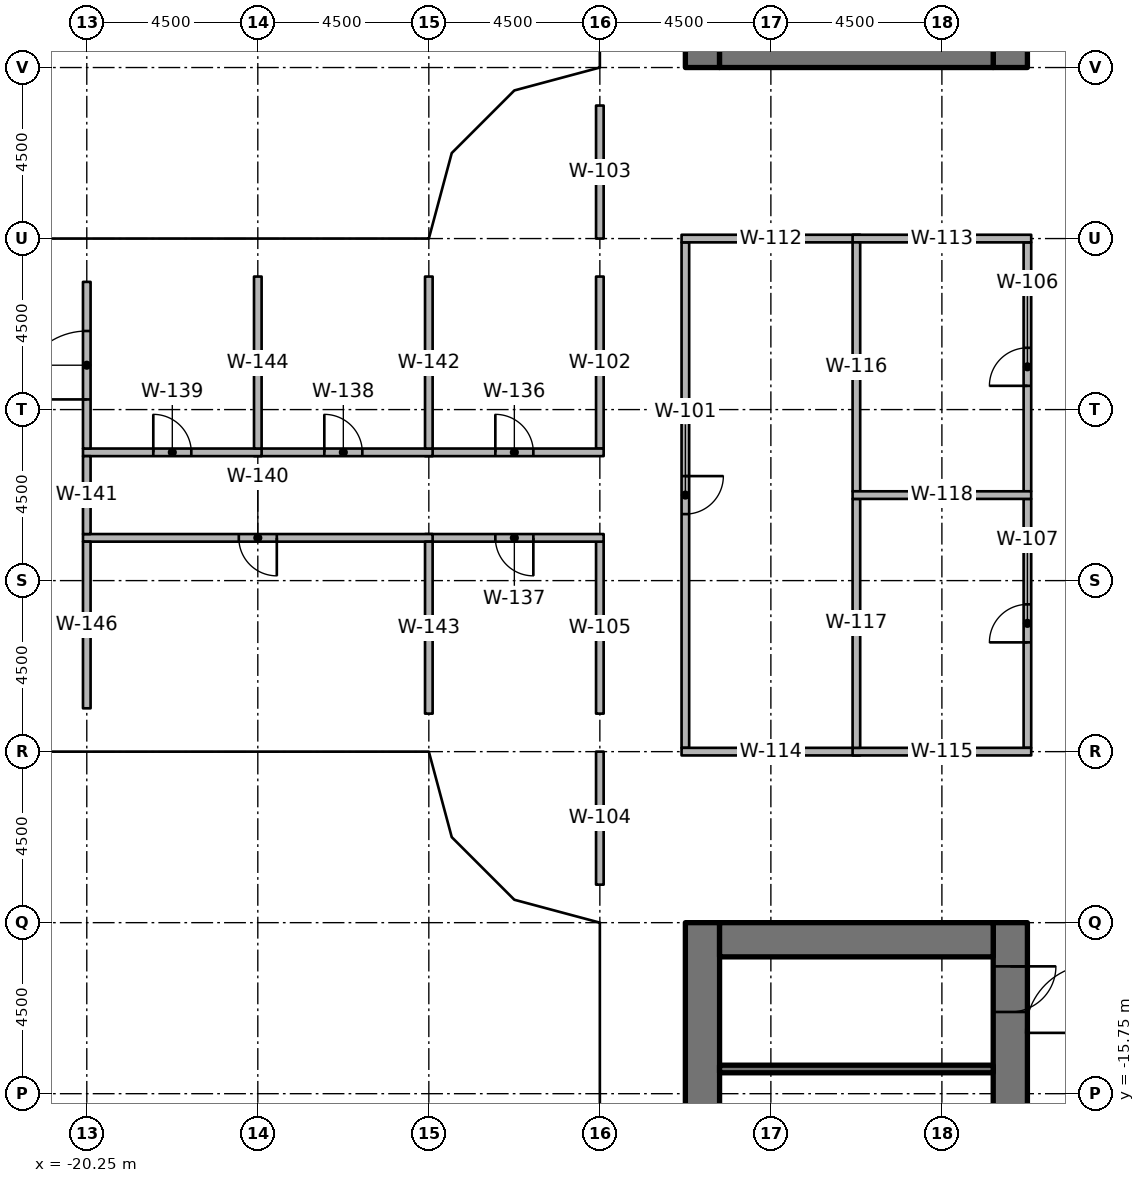
"""IFC4 building model, lengths in metres.
Left out: names, types, materials, properties, quantities, classifications, styles, units other than length and angle.
Written with IfcOpenShell. Run it as: python <this file> out.ifc"""

import sys

from ifc_helpers import new_model, si_unit, direction, frame, frame_2d, origin, origin_2d, place, context, subcontext, project, spatial, rectangle, extrude, element, fill, save


model = new_model("IFC4")
c1 = context("Model", 3, precision=1e-05, world=origin(), true_north=direction((0.0, 1.0)))
c2 = subcontext(c1, "Body", "Model", "MODEL_VIEW")
j1 = project(units=[si_unit("LENGTHUNIT", "METRE"), si_unit("PLANEANGLEUNIT", "RADIAN")], contexts=[c1])
p1 = place(None, origin())
s1 = spatial("IfcSite", under=j1, at=p1, CompositionType="ELEMENT")
p2 = place(p1, origin())
s2 = spatial("IfcBuilding", under=s1, at=p2, CompositionType="ELEMENT")
p3 = place(p2, frame((0.0, 0.0, 27.0)))
s3 = spatial("IfcBuildingStorey", under=s2, at=p3, CompositionType="ELEMENT", Elevation=27.0)
for number, where, z_axis, x_axis in (
    (1, (-20.25, -6.11, 0.0), (0.0, 0.0, 1.0), (1.0, 0.0, 0.0)),
    (2, (-20.25, 6.11, 0.0), (0.0, 0.0, 1.0), (1.0, 0.0, 0.0)),
    (3, (-15.75, -6.25, 0.0), (0.0, 0.0, 1.0), (1.0, 0.0, 0.0)),
    (4, (-15.75, 6.25, 0.0), (0.0, 0.0, 1.0), (1.0, 0.0, 0.0)),
    (5, (-10.75, -6.25, 0.0), (0.0, 0.0, 1.0), (1.0, 0.0, 0.0)),
    (6, (-10.75, 6.25, 0.0), (0.0, 0.0, 1.0), (1.0, 0.0, 0.0)),
    (7, (-6.25, -15.75, 0.0), (0.0, 0.0, 1.0), (1.0, 0.0, 0.0)),
    (8, (-6.25, -10.75, 0.0), (0.0, 0.0, 1.0), (1.0, 0.0, 0.0)),
    (9, (-6.25, -6.25, 0.0), (0.0, 0.0, 1.0), (1.0, 0.0, 0.0)),
    (10, (-6.25, 6.25, 0.0), (0.0, 0.0, 1.0), (1.0, 0.0, 0.0)),
    (11, (-6.25, 10.75, 0.0), (0.0, 0.0, 1.0), (1.0, 0.0, 0.0)),
):
    element("IfcColumn", number, at=place(p3, frame(where, z_axis=z_axis, x_axis=x_axis)), inside=s3, PredefinedType="COLUMN", context=c2, shape_type="SweptSolid", body=[
        extrude(rectangle(XDim=1.0, YDim=1.0, at=origin_2d()), origin(), (0.0, 0.0, 1.0), 4.05),
    ])
p4 = place(p3, frame((-4.05, 11.25, 0.0), z_axis=(0.0, 0.0, 1.0), x_axis=(0.0, 1.0, 0.0)))
e12 = element("IfcWall", 12, at=p4, inside=s3, PredefinedType="SHEAR", context=c2, shape_type="SweptSolid", body=[
    extrude(rectangle(XDim=15.0, YDim=0.9, at=frame_2d((7.5, 0.0))), origin(), (0.0, 0.0, 1.0), 4.2),
])
p5 = place(p4, frame((7.15, 0.0, 0.0)))
e13 = element("IfcOpeningElement", 13, at=p5, cuts=e12, PredefinedType="OPENING", context=c2, shape_type="SweptSolid", body=[
    extrude(rectangle(XDim=1.5, YDim=2.3, at=frame_2d((0.75, 1.15))), frame((0.0, 0.46, 0.0), z_axis=(0.0, -1.0, 0.0), x_axis=(1.0, 0.0, 0.0)), (0.0, 0.0, 1.0), 0.92),
])
p6 = place(p4, frame((13.9, 0.0, 0.0)))
e14 = element("IfcOpeningElement", 14, at=p6, cuts=e12, PredefinedType="OPENING", context=c2, shape_type="SweptSolid", body=[
    extrude(rectangle(XDim=0.9, YDim=2.1, at=frame_2d((0.45, 1.05))), frame((0.0, 0.46, 0.0), z_axis=(0.0, -1.0, 0.0), x_axis=(1.0, 0.0, 0.0)), (0.0, 0.0, 1.0), 0.92),
])
p7 = place(p4, frame((1.15, 0.0, 0.0)))
e15 = element("IfcOpeningElement", 15, at=p7, cuts=e12, PredefinedType="OPENING", context=c2, shape_type="SweptSolid", body=[
    extrude(rectangle(XDim=1.2, YDim=2.1, at=frame_2d((0.6, 1.05))), frame((0.0, 0.46, 0.0), z_axis=(0.0, -1.0, 0.0), x_axis=(1.0, 0.0, 0.0)), (0.0, 0.0, 1.0), 0.92),
])
p8 = place(p3, frame((4.05, 11.25, 0.0), z_axis=(0.0, 0.0, 1.0), x_axis=(0.0, 1.0, 0.0)))
e16 = element("IfcWall", 16, at=p8, inside=s3, PredefinedType="SHEAR", context=c2, shape_type="SweptSolid", body=[
    extrude(rectangle(XDim=15.0, YDim=0.9, at=frame_2d((7.5, 0.0))), origin(), (0.0, 0.0, 1.0), 4.2),
])
p9 = place(p8, frame((7.15, 0.0, 0.0)))
e17 = element("IfcOpeningElement", 17, at=p9, cuts=e16, PredefinedType="OPENING", context=c2, shape_type="SweptSolid", body=[
    extrude(rectangle(XDim=1.5, YDim=2.3, at=frame_2d((0.75, 1.15))), frame((0.0, 0.46, 0.0), z_axis=(0.0, -1.0, 0.0), x_axis=(1.0, 0.0, 0.0)), (0.0, 0.0, 1.0), 0.92),
])
p10 = place(p8, frame((5.55, 0.0, 0.0)))
e18 = element("IfcOpeningElement", 18, at=p10, cuts=e16, PredefinedType="OPENING", context=c2, shape_type="SweptSolid", body=[
    extrude(rectangle(XDim=1.2, YDim=2.1, at=frame_2d((0.6, 1.05))), frame((0.0, 0.46, 0.0), z_axis=(0.0, -1.0, 0.0), x_axis=(1.0, 0.0, 0.0)), (0.0, 0.0, 1.0), 0.92),
])
p11 = place(p3, frame((-3.6, 11.7, 0.0), z_axis=(0.0, 0.0, 1.0), x_axis=(1.0, 0.0, 0.0)))
e19 = element("IfcWall", 19, at=p11, inside=s3, PredefinedType="SHEAR", context=c2, shape_type="SweptSolid", body=[
    extrude(rectangle(XDim=7.2, YDim=0.9, at=frame_2d((3.6, 0.0))), origin(), (0.0, 0.0, 1.0), 4.2),
])
p12 = place(p3, frame((-4.05, -11.25, 0.0), z_axis=(0.0, 0.0, 1.0), x_axis=(0.0, -1.0, 0.0)))
e20 = element("IfcWall", 20, at=p12, inside=s3, PredefinedType="SHEAR", context=c2, shape_type="SweptSolid", body=[
    extrude(rectangle(XDim=15.0, YDim=0.9, at=frame_2d((7.5, 0.0))), origin(), (0.0, 0.0, 1.0), 4.2),
])
p13 = place(p12, frame((7.15, 0.0, 0.0)))
e21 = element("IfcOpeningElement", 21, at=p13, cuts=e20, PredefinedType="OPENING", context=c2, shape_type="SweptSolid", body=[
    extrude(rectangle(XDim=1.5, YDim=2.3, at=frame_2d((0.75, 1.15))), frame((0.0, 0.46, 0.0), z_axis=(0.0, -1.0, 0.0), x_axis=(1.0, 0.0, 0.0)), (0.0, 0.0, 1.0), 0.92),
])
p14 = place(p12, frame((5.55, 0.0, 0.0)))
e22 = element("IfcOpeningElement", 22, at=p14, cuts=e20, PredefinedType="OPENING", context=c2, shape_type="SweptSolid", body=[
    extrude(rectangle(XDim=1.2, YDim=2.1, at=frame_2d((0.6, 1.05))), frame((0.0, 0.46, 0.0), z_axis=(0.0, -1.0, 0.0), x_axis=(1.0, 0.0, 0.0)), (0.0, 0.0, 1.0), 0.92),
])
p15 = place(p3, frame((4.05, -11.25, 0.0), z_axis=(0.0, 0.0, 1.0), x_axis=(0.0, -1.0, 0.0)))
e23 = element("IfcWall", 23, at=p15, inside=s3, PredefinedType="SHEAR", context=c2, shape_type="SweptSolid", body=[
    extrude(rectangle(XDim=15.0, YDim=0.9, at=frame_2d((7.5, 0.0))), origin(), (0.0, 0.0, 1.0), 4.2),
])
p16 = place(p15, frame((7.15, 0.0, 0.0)))
e24 = element("IfcOpeningElement", 24, at=p16, cuts=e23, PredefinedType="OPENING", context=c2, shape_type="SweptSolid", body=[
    extrude(rectangle(XDim=1.5, YDim=2.3, at=frame_2d((0.75, 1.15))), frame((0.0, 0.46, 0.0), z_axis=(0.0, -1.0, 0.0), x_axis=(1.0, 0.0, 0.0)), (0.0, 0.0, 1.0), 0.92),
])
p17 = place(p15, frame((13.9, 0.0, 0.0)))
e25 = element("IfcOpeningElement", 25, at=p17, cuts=e23, PredefinedType="OPENING", context=c2, shape_type="SweptSolid", body=[
    extrude(rectangle(XDim=0.9, YDim=2.1, at=frame_2d((0.45, 1.05))), frame((0.0, 0.46, 0.0), z_axis=(0.0, -1.0, 0.0), x_axis=(1.0, 0.0, 0.0)), (0.0, 0.0, 1.0), 0.92),
])
p18 = place(p15, frame((1.15, 0.0, 0.0)))
e26 = element("IfcOpeningElement", 26, at=p18, cuts=e23, PredefinedType="OPENING", context=c2, shape_type="SweptSolid", body=[
    extrude(rectangle(XDim=1.2, YDim=2.1, at=frame_2d((0.6, 1.05))), frame((0.0, 0.46, 0.0), z_axis=(0.0, -1.0, 0.0), x_axis=(1.0, 0.0, 0.0)), (0.0, 0.0, 1.0), 0.92),
])
p19 = place(p3, frame((-3.6, -11.7, 0.0), z_axis=(0.0, 0.0, 1.0), x_axis=(1.0, 0.0, 0.0)))
e27 = element("IfcWall", 27, at=p19, inside=s3, PredefinedType="SHEAR", context=c2, shape_type="SweptSolid", body=[
    extrude(rectangle(XDim=7.2, YDim=0.9, at=frame_2d((3.6, 0.0))), origin(), (0.0, 0.0, 1.0), 4.2),
])
p20 = place(p3, frame((3.6, -15.1, 0.0), z_axis=(0.0, 0.0, 1.0), x_axis=(-1.0, 0.0, 0.0)))
e28 = element("IfcWall", 28, at=p20, inside=s3, PredefinedType="SHEAR", context=c2, shape_type="SweptSolid", body=[
    extrude(rectangle(XDim=7.2, YDim=0.2, at=frame_2d((3.6, 0.0))), origin(), (0.0, 0.0, 1.0), 4.05),
])
p21 = place(p3, frame((-4.5, 6.65, 0.0), z_axis=(0.0, 0.0, 1.0), x_axis=(0.0, -1.0, 0.0)))
e29 = element("IfcWall", 29, at=p21, inside=s3, PredefinedType="PARTITIONING", context=c2, shape_type="SweptSolid", body=[
    extrude(rectangle(XDim=13.3, YDim=0.2, at=frame_2d((6.65, 0.0))), origin(), (0.0, 0.0, 1.0), 3.131),
])
p22 = place(p21, frame((6.15, 0.0, 0.0)))
e30 = element("IfcOpeningElement", 30, at=p22, cuts=e29, PredefinedType="OPENING", context=c2, shape_type="SweptSolid", body=[
    extrude(rectangle(XDim=1.0, YDim=2.1, at=frame_2d((0.5, 1.05))), frame((0.0, 0.11, 0.0), z_axis=(0.0, -1.0, 0.0), x_axis=(1.0, 0.0, 0.0)), (0.0, 0.0, 1.0), 0.22),
])
p23 = place(p3, frame((-6.75, 1.225, 0.0), z_axis=(0.0, 0.0, 1.0), x_axis=(0.0, 1.0, 0.0)))
e31 = element("IfcWall", 31, at=p23, inside=s3, PredefinedType="PARTITIONING", context=c2, shape_type="SweptSolid", body=[
    extrude(rectangle(XDim=4.525, YDim=0.2, at=frame_2d((2.262, 0.0))), origin(), (0.0, 0.0, 1.0), 3.131),
])
for number, where, z_axis, x_axis in (
    (32, (-6.75, 6.75, 0.0), (0.0, 0.0, 1.0), (0.0, 1.0, 0.0)),
    (33, (-6.75, -10.25, 0.0), (0.0, 0.0, 1.0), (0.0, 1.0, 0.0)),
):
    element("IfcWall", number, at=place(p3, frame(where, z_axis=z_axis, x_axis=x_axis)), inside=s3, PredefinedType="PARTITIONING", context=c2, shape_type="SweptSolid", body=[
        extrude(rectangle(XDim=3.5, YDim=0.2, at=frame_2d((1.75, 0.0))), origin(), (0.0, 0.0, 1.0), 3.131),
    ])
p24 = place(p3, frame((-6.75, -5.75, 0.0), z_axis=(0.0, 0.0, 1.0), x_axis=(0.0, 1.0, 0.0)))
e34 = element("IfcWall", 34, at=p24, inside=s3, PredefinedType="PARTITIONING", context=c2, shape_type="SweptSolid", body=[
    extrude(rectangle(XDim=4.525, YDim=0.2, at=frame_2d((2.262, 0.0))), origin(), (0.0, 0.0, 1.0), 3.131),
])
p25 = place(p3, frame((4.5, 0.1, 0.0), z_axis=(0.0, 0.0, 1.0), x_axis=(0.0, 1.0, 0.0)))
e35 = element("IfcWall", 35, at=p25, inside=s3, PredefinedType="PARTITIONING", context=c2, shape_type="SweptSolid", body=[
    extrude(rectangle(XDim=6.55, YDim=0.2, at=frame_2d((3.275, 0.0))), origin(), (0.0, 0.0, 1.0), 3.131),
])
p26 = place(p25, frame((2.775, 0.0, 0.0)))
e36 = element("IfcOpeningElement", 36, at=p26, cuts=e35, PredefinedType="OPENING", context=c2, shape_type="SweptSolid", body=[
    extrude(rectangle(XDim=1.0, YDim=2.1, at=frame_2d((0.5, 1.05))), frame((0.0, 0.11, 0.0), z_axis=(0.0, -1.0, 0.0), x_axis=(1.0, 0.0, 0.0)), (0.0, 0.0, 1.0), 0.22),
])
p27 = place(p3, frame((4.5, -6.65, 0.0), z_axis=(0.0, 0.0, 1.0), x_axis=(0.0, 1.0, 0.0)))
e37 = element("IfcWall", 37, at=p27, inside=s3, PredefinedType="PARTITIONING", context=c2, shape_type="SweptSolid", body=[
    extrude(rectangle(XDim=6.55, YDim=0.2, at=frame_2d((3.275, 0.0))), origin(), (0.0, 0.0, 1.0), 3.131),
])
p28 = place(p27, frame((2.775, 0.0, 0.0)))
e38 = element("IfcOpeningElement", 38, at=p28, cuts=e37, PredefinedType="OPENING", context=c2, shape_type="SweptSolid", body=[
    extrude(rectangle(XDim=1.0, YDim=2.1, at=frame_2d((0.5, 1.05))), frame((0.0, 0.11, 0.0), z_axis=(0.0, -1.0, 0.0), x_axis=(1.0, 0.0, 0.0)), (0.0, 0.0, 1.0), 0.22),
])
for number, where, z_axis, x_axis in (
    (39, (-4.6, 6.75, 0.0), (0.0, 0.0, 1.0), (1.0, 0.0, 0.0)),
    (40, (-0.1, 6.75, 0.0), (0.0, 0.0, 1.0), (1.0, 0.0, 0.0)),
    (41, (-4.6, -6.75, 0.0), (0.0, 0.0, 1.0), (1.0, 0.0, 0.0)),
    (42, (-0.1, -6.75, 0.0), (0.0, 0.0, 1.0), (1.0, 0.0, 0.0)),
):
    element("IfcWall", number, at=place(p3, frame(where, z_axis=z_axis, x_axis=x_axis)), inside=s3, PredefinedType="PARTITIONING", context=c2, shape_type="SweptSolid", body=[
        extrude(rectangle(XDim=4.7, YDim=0.2, at=frame_2d((2.35, 0.0))), origin(), (0.0, 0.0, 1.0), 3.131),
    ])
for number, where, z_axis, x_axis in (
    (43, (0.0, 0.1, 0.0), (0.0, 0.0, 1.0), (0.0, 1.0, 0.0)),
    (44, (0.0, -6.65, 0.0), (0.0, 0.0, 1.0), (0.0, 1.0, 0.0)),
):
    element("IfcWall", number, at=place(p3, frame(where, z_axis=z_axis, x_axis=x_axis)), inside=s3, PredefinedType="PARTITIONING", context=c2, shape_type="SweptSolid", body=[
        extrude(rectangle(XDim=6.55, YDim=0.2, at=frame_2d((3.275, 0.0))), origin(), (0.0, 0.0, 1.0), 3.131),
    ])
p29 = place(p3, frame((-0.1, 0.0, 0.0), z_axis=(0.0, 0.0, 1.0), x_axis=(1.0, 0.0, 0.0)))
e45 = element("IfcWall", 45, at=p29, inside=s3, PredefinedType="PARTITIONING", context=c2, shape_type="SweptSolid", body=[
    extrude(rectangle(XDim=4.7, YDim=0.2, at=frame_2d((2.35, 0.0))), origin(), (0.0, 0.0, 1.0), 3.131),
])
p30 = place(p3, frame((-11.35, 1.125, 0.0), z_axis=(0.0, 0.0, 1.0), x_axis=(1.0, 0.0, 0.0)))
e46 = element("IfcWall", 46, at=p30, inside=s3, PredefinedType="PARTITIONING", context=c2, shape_type="SweptSolid", body=[
    extrude(rectangle(XDim=4.7, YDim=0.2, at=frame_2d((2.35, 0.0))), origin(), (0.0, 0.0, 1.0), 3.131),
])
p31 = place(p30, frame((1.85, 0.0, 0.0)))
e47 = element("IfcOpeningElement", 47, at=p31, cuts=e46, PredefinedType="OPENING", context=c2, shape_type="SweptSolid", body=[
    extrude(rectangle(XDim=1.0, YDim=2.1, at=frame_2d((0.5, 1.05))), frame((0.0, 0.11, 0.0), z_axis=(0.0, -1.0, 0.0), x_axis=(1.0, 0.0, 0.0)), (0.0, 0.0, 1.0), 0.22),
])
p32 = place(p3, frame((-6.65, -1.125, 0.0), z_axis=(0.0, 0.0, 1.0), x_axis=(-1.0, 0.0, 0.0)))
e48 = element("IfcWall", 48, at=p32, inside=s3, PredefinedType="PARTITIONING", context=c2, shape_type="SweptSolid", body=[
    extrude(rectangle(XDim=4.7, YDim=0.2, at=frame_2d((2.35, 0.0))), origin(), (0.0, 0.0, 1.0), 3.131),
])
p33 = place(p32, frame((1.85, 0.0, 0.0)))
e49 = element("IfcOpeningElement", 49, at=p33, cuts=e48, PredefinedType="OPENING", context=c2, shape_type="SweptSolid", body=[
    extrude(rectangle(XDim=1.0, YDim=2.1, at=frame_2d((0.5, 1.05))), frame((0.0, 0.11, 0.0), z_axis=(0.0, -1.0, 0.0), x_axis=(1.0, 0.0, 0.0)), (0.0, 0.0, 1.0), 0.22),
])
p34 = place(p3, frame((-15.85, 1.125, 0.0), z_axis=(0.0, 0.0, 1.0), x_axis=(1.0, 0.0, 0.0)))
e50 = element("IfcWall", 50, at=p34, inside=s3, PredefinedType="PARTITIONING", context=c2, shape_type="SweptSolid", body=[
    extrude(rectangle(XDim=4.7, YDim=0.2, at=frame_2d((2.35, 0.0))), origin(), (0.0, 0.0, 1.0), 3.131),
])
p35 = place(p34, frame((1.85, 0.0, 0.0)))
e51 = element("IfcOpeningElement", 51, at=p35, cuts=e50, PredefinedType="OPENING", context=c2, shape_type="SweptSolid", body=[
    extrude(rectangle(XDim=1.0, YDim=2.1, at=frame_2d((0.5, 1.05))), frame((0.0, 0.11, 0.0), z_axis=(0.0, -1.0, 0.0), x_axis=(1.0, 0.0, 0.0)), (0.0, 0.0, 1.0), 0.22),
])
p36 = place(p3, frame((-20.35, 1.125, 0.0), z_axis=(0.0, 0.0, 1.0), x_axis=(1.0, 0.0, 0.0)))
e52 = element("IfcWall", 52, at=p36, inside=s3, PredefinedType="PARTITIONING", context=c2, shape_type="SweptSolid", body=[
    extrude(rectangle(XDim=4.7, YDim=0.2, at=frame_2d((2.35, 0.0))), origin(), (0.0, 0.0, 1.0), 3.131),
])
p37 = place(p36, frame((1.85, 0.0, 0.0)))
e53 = element("IfcOpeningElement", 53, at=p37, cuts=e52, PredefinedType="OPENING", context=c2, shape_type="SweptSolid", body=[
    extrude(rectangle(XDim=1.0, YDim=2.1, at=frame_2d((0.5, 1.05))), frame((0.0, 0.11, 0.0), z_axis=(0.0, -1.0, 0.0), x_axis=(1.0, 0.0, 0.0)), (0.0, 0.0, 1.0), 0.22),
])
p38 = place(p3, frame((-11.15, -1.125, 0.0), z_axis=(0.0, 0.0, 1.0), x_axis=(-1.0, 0.0, 0.0)))
e54 = element("IfcWall", 54, at=p38, inside=s3, PredefinedType="PARTITIONING", context=c2, shape_type="SweptSolid", body=[
    extrude(rectangle(XDim=9.2, YDim=0.2, at=frame_2d((4.6, 0.0))), origin(), (0.0, 0.0, 1.0), 3.131),
])
p39 = place(p38, frame((4.1, 0.0, 0.0)))
e55 = element("IfcOpeningElement", 55, at=p39, cuts=e54, PredefinedType="OPENING", context=c2, shape_type="SweptSolid", body=[
    extrude(rectangle(XDim=1.0, YDim=2.1, at=frame_2d((0.5, 1.05))), frame((0.0, 0.11, 0.0), z_axis=(0.0, -1.0, 0.0), x_axis=(1.0, 0.0, 0.0)), (0.0, 0.0, 1.0), 0.22),
])
p40 = place(p3, frame((-20.25, -1.025, 0.0), z_axis=(0.0, 0.0, 1.0), x_axis=(0.0, 1.0, 0.0)))
e56 = element("IfcWall", 56, at=p40, inside=s3, PredefinedType="PARTITIONING", context=c2, shape_type="SweptSolid", body=[
    extrude(rectangle(XDim=2.05, YDim=0.2, at=frame_2d((1.025, 0.0))), origin(), (0.0, 0.0, 1.0), 3.131),
])
for number, where, z_axis, x_axis in (
    (57, (-11.25, 1.225, 0.0), (0.0, 0.0, 1.0), (0.0, 1.0, 0.0)),
    (58, (-11.25, -5.75, 0.0), (0.0, 0.0, 1.0), (0.0, 1.0, 0.0)),
    (59, (-15.75, 1.225, 0.0), (0.0, 0.0, 1.0), (0.0, 1.0, 0.0)),
):
    element("IfcWall", number, at=place(p3, frame(where, z_axis=z_axis, x_axis=x_axis)), inside=s3, PredefinedType="PARTITIONING", context=c2, shape_type="SweptSolid", body=[
        extrude(rectangle(XDim=4.525, YDim=0.2, at=frame_2d((2.262, 0.0))), origin(), (0.0, 0.0, 1.0), 3.131),
    ])
p41 = place(p3, frame((-20.25, 1.225, 0.0), z_axis=(0.0, 0.0, 1.0), x_axis=(0.0, 1.0, 0.0)))
e60 = element("IfcWall", 60, at=p41, inside=s3, PredefinedType="PARTITIONING", context=c2, shape_type="SweptSolid", body=[
    extrude(rectangle(XDim=4.385, YDim=0.2, at=frame_2d((2.192, 0.0))), origin(), (0.0, 0.0, 1.0), 3.131),
])
p42 = place(p41, frame((1.292, 0.0, 0.0)))
e61 = element("IfcOpeningElement", 61, at=p42, cuts=e60, PredefinedType="OPENING", context=c2, shape_type="SweptSolid", body=[
    extrude(rectangle(XDim=1.8, YDim=2.1, at=frame_2d((0.9, 1.05))), frame((0.0, 0.11, 0.0), z_axis=(0.0, -1.0, 0.0), x_axis=(1.0, 0.0, 0.0)), (0.0, 0.0, 1.0), 0.22),
])
p43 = place(p3, frame((-20.25, -5.61, 0.0), z_axis=(0.0, 0.0, 1.0), x_axis=(0.0, 1.0, 0.0)))
e62 = element("IfcWall", 62, at=p43, inside=s3, PredefinedType="PARTITIONING", context=c2, shape_type="SweptSolid", body=[
    extrude(rectangle(XDim=4.385, YDim=0.2, at=frame_2d((2.192, 0.0))), origin(), (0.0, 0.0, 1.0), 3.131),
])
p44 = place(p18, origin())
e63 = element("IfcDoor", 63, at=p44, inside=s3, OperationType="SINGLE_SWING_LEFT", PredefinedType="DOOR", context=c2, shape_type="SweptSolid", body=[
    extrude(rectangle(XDim=1.2, YDim=2.1, at=frame_2d((0.6, 1.05))), frame((0.0, 0.025, 0.0), z_axis=(0.0, -1.0, 0.0), x_axis=(1.0, 0.0, 0.0)), (0.0, 0.0, 1.0), 0.05),
])
fill(e26, e63)
p45 = place(p26, origin())
e64 = element("IfcDoor", 64, at=p45, inside=s3, OperationType="SINGLE_SWING_LEFT", PredefinedType="DOOR", context=c2, shape_type="SweptSolid", body=[
    extrude(rectangle(XDim=1.0, YDim=2.1, at=frame_2d((0.5, 1.05))), frame((0.0, 0.025, 0.0), z_axis=(0.0, -1.0, 0.0), x_axis=(1.0, 0.0, 0.0)), (0.0, 0.0, 1.0), 0.05),
])
fill(e36, e64)
p46 = place(p28, origin())
e65 = element("IfcDoor", 65, at=p46, inside=s3, OperationType="SINGLE_SWING_RIGHT", PredefinedType="DOOR", context=c2, shape_type="SweptSolid", body=[
    extrude(rectangle(XDim=1.0, YDim=2.1, at=frame_2d((0.5, 1.05))), frame((0.0, 0.025, 0.0), z_axis=(0.0, -1.0, 0.0), x_axis=(1.0, 0.0, 0.0)), (0.0, 0.0, 1.0), 0.05),
])
fill(e38, e65)
p47 = place(p22, origin())
e66 = element("IfcDoor", 66, at=p47, inside=s3, OperationType="SINGLE_SWING_RIGHT", PredefinedType="DOOR", context=c2, shape_type="SweptSolid", body=[
    extrude(rectangle(XDim=1.0, YDim=2.1, at=frame_2d((0.5, 1.05))), frame((0.0, 0.025, 0.0), z_axis=(0.0, -1.0, 0.0), x_axis=(1.0, 0.0, 0.0)), (0.0, 0.0, 1.0), 0.05),
])
fill(e30, e66)
p48 = place(p42, origin())
e67 = element("IfcDoor", 67, at=p48, inside=s3, OperationType="DOUBLE_DOOR_SINGLE_SWING", PredefinedType="DOOR", context=c2, shape_type="SweptSolid", body=[
    extrude(rectangle(XDim=1.8, YDim=2.1, at=frame_2d((0.9, 1.05))), frame((0.0, 0.025, 0.0), z_axis=(0.0, -1.0, 0.0), x_axis=(1.0, 0.0, 0.0)), (0.0, 0.0, 1.0), 0.05),
])
fill(e61, e67)
p49 = place(p31, origin())
e68 = element("IfcDoor", 68, at=p49, inside=s3, OperationType="SINGLE_SWING_RIGHT", PredefinedType="DOOR", context=c2, shape_type="SweptSolid", body=[
    extrude(rectangle(XDim=1.0, YDim=2.1, at=frame_2d((0.5, 1.05))), frame((0.0, 0.025, 0.0), z_axis=(0.0, -1.0, 0.0), x_axis=(1.0, 0.0, 0.0)), (0.0, 0.0, 1.0), 0.05),
])
fill(e47, e68)
p50 = place(p35, origin())
e69 = element("IfcDoor", 69, at=p50, inside=s3, OperationType="SINGLE_SWING_RIGHT", PredefinedType="DOOR", context=c2, shape_type="SweptSolid", body=[
    extrude(rectangle(XDim=1.0, YDim=2.1, at=frame_2d((0.5, 1.05))), frame((0.0, 0.025, 0.0), z_axis=(0.0, -1.0, 0.0), x_axis=(1.0, 0.0, 0.0)), (0.0, 0.0, 1.0), 0.05),
])
fill(e51, e69)
p51 = place(p37, origin())
e70 = element("IfcDoor", 70, at=p51, inside=s3, OperationType="SINGLE_SWING_RIGHT", PredefinedType="DOOR", context=c2, shape_type="SweptSolid", body=[
    extrude(rectangle(XDim=1.0, YDim=2.1, at=frame_2d((0.5, 1.05))), frame((0.0, 0.025, 0.0), z_axis=(0.0, -1.0, 0.0), x_axis=(1.0, 0.0, 0.0)), (0.0, 0.0, 1.0), 0.05),
])
fill(e53, e70)
p52 = place(p33, origin())
e71 = element("IfcDoor", 71, at=p52, inside=s3, OperationType="SINGLE_SWING_RIGHT", PredefinedType="DOOR", context=c2, shape_type="SweptSolid", body=[
    extrude(rectangle(XDim=1.0, YDim=2.1, at=frame_2d((0.5, 1.05))), frame((0.0, 0.025, 0.0), z_axis=(0.0, -1.0, 0.0), x_axis=(1.0, 0.0, 0.0)), (0.0, 0.0, 1.0), 0.05),
])
fill(e49, e71)
p53 = place(p39, origin())
e72 = element("IfcDoor", 72, at=p53, inside=s3, OperationType="SINGLE_SWING_LEFT", PredefinedType="DOOR", context=c2, shape_type="SweptSolid", body=[
    extrude(rectangle(XDim=1.0, YDim=2.1, at=frame_2d((0.5, 1.05))), frame((0.0, 0.025, 0.0), z_axis=(0.0, -1.0, 0.0), x_axis=(1.0, 0.0, 0.0)), (0.0, 0.0, 1.0), 0.05),
])
fill(e55, e72)
save(model, sys.argv[1])
